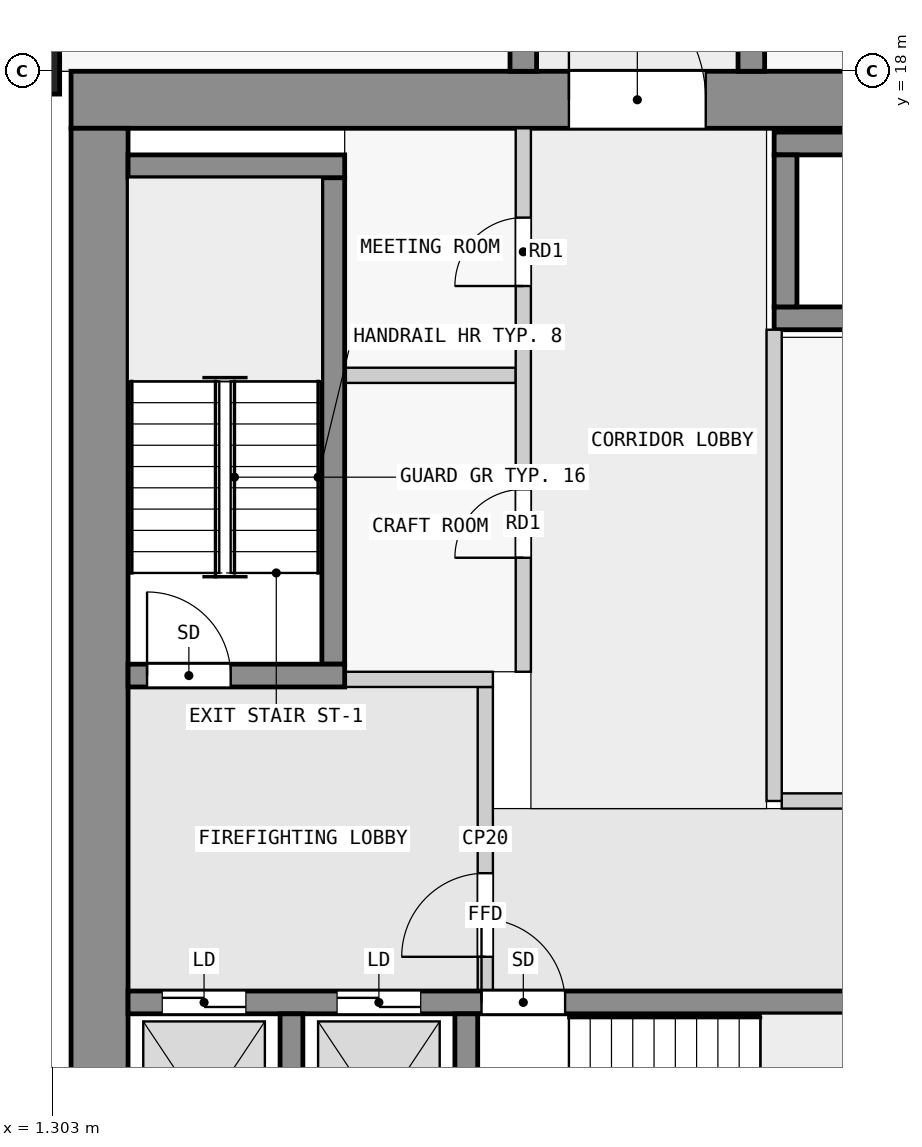
"""IFC4 building model, lengths in metres.
Left out: names, types, materials, properties, quantities, classifications, styles, units other than length and angle.
Written with IfcOpenShell. Run it as: python <this file> out.ifc"""

import sys

from ifc_helpers import new_model, si_unit, direction, frame, frame_2d, origin, origin_2d, place, context, subcontext, project, spatial, rectangle, extrude, element, fill, save


model = new_model("IFC4")
c1 = context("Model", 3, precision=1e-05, world=origin(), true_north=direction((0.0, 1.0)))
c2 = subcontext(c1, "Body", "Model", "MODEL_VIEW")
j1 = project(units=[si_unit("LENGTHUNIT", "METRE"), si_unit("PLANEANGLEUNIT", "RADIAN")], contexts=[c1])
p1 = place(None, origin())
s1 = spatial("IfcSite", under=j1, at=p1, CompositionType="ELEMENT")
p2 = place(p1, origin())
s2 = spatial("IfcBuilding", under=s1, at=p2, CompositionType="ELEMENT")
p3 = place(p2, frame((0.0, 0.0, 54.8)))
s3 = spatial("IfcBuildingStorey", under=s2, at=p3, CompositionType="ELEMENT", Elevation=54.8)
p4 = place(p3, frame((0.7, 18.0, 0.0), z_axis=(0.0, 0.0, 1.0), x_axis=(0.0, 1.0, 0.0)))
e1 = element("IfcColumn", 1, at=p4, inside=s3, PredefinedType="COLUMN", context=c2, shape_type="SweptSolid", body=[
    extrude(rectangle(XDim=0.6, YDim=1.4, at=origin_2d()), origin(), (0.0, 0.0, 1.0), 3.5),
])
p5 = place(p3, frame((1.55, 17.625, 0.0), z_axis=(0.0, 0.0, 1.0), x_axis=(1.0, 0.0, 0.0)))
e2 = element("IfcWall", 2, at=p5, inside=s3, PredefinedType="SHEAR", context=c2, shape_type="SweptSolid", body=[
    extrude(rectangle(XDim=20.95, YDim=0.75, at=frame_2d((10.475, 0.0))), origin(), (0.0, 0.0, 1.0), 3.25),
])
p6 = place(p5, frame((6.55, 0.0, 0.0)))
e3 = element("IfcOpeningElement", 3, at=p6, cuts=e2, PredefinedType="OPENING", context=c2, shape_type="SweptSolid", body=[
    extrude(rectangle(XDim=1.8, YDim=2.1, at=frame_2d((0.9, 1.05))), frame((0.0, 0.385, 0.0), z_axis=(0.0, -1.0, 0.0), x_axis=(1.0, 0.0, 0.0)), (0.0, 0.0, 1.0), 0.77),
])
p7 = place(p3, frame((1.925, 2.5, 0.0), z_axis=(0.0, 0.0, 1.0), x_axis=(0.0, 1.0, 0.0)))
e4 = element("IfcWall", 4, at=p7, inside=s3, PredefinedType="SHEAR", context=c2, shape_type="SweptSolid", body=[
    extrude(rectangle(XDim=14.75, YDim=0.75, at=frame_2d((7.375, 0.0))), origin(), (0.0, 0.0, 1.0), 3.25),
])
for number, where, z_axis, x_axis in (
    (5, (4.45, 2.8, 0.0), (0.0, 0.0, 1.0), (0.0, 1.0, 0.0)),
    (6, (6.75, 2.8, 0.0), (0.0, 0.0, 1.0), (0.0, 1.0, 0.0)),
):
    element("IfcWall", number, at=place(p3, frame(where, z_axis=z_axis, x_axis=x_axis)), inside=s3, PredefinedType="SHEAR", context=c2, shape_type="SweptSolid", body=[
        extrude(rectangle(XDim=2.8, YDim=0.3, at=frame_2d((1.4, 0.0))), origin(), (0.0, 0.0, 1.0), 3.25),
    ])
p8 = place(p3, frame((2.3, 5.75, 0.0), z_axis=(0.0, 0.0, 1.0), x_axis=(1.0, 0.0, 0.0)))
e7 = element("IfcWall", 7, at=p8, inside=s3, PredefinedType="SHEAR", context=c2, shape_type="SweptSolid", body=[
    extrude(rectangle(XDim=18.8, YDim=0.3, at=frame_2d((9.4, 0.0))), origin(), (0.0, 0.0, 1.0), 3.25),
])
p9 = place(p8, frame((4.65, 0.0, 0.0)))
e8 = element("IfcOpeningElement", 8, at=p9, cuts=e7, PredefinedType="OPENING", context=c2, shape_type="SweptSolid", body=[
    extrude(rectangle(XDim=1.1, YDim=2.1, at=frame_2d((0.55, 1.05))), frame((0.0, 0.16, 0.0), z_axis=(0.0, -1.0, 0.0), x_axis=(1.0, 0.0, 0.0)), (0.0, 0.0, 1.0), 0.32),
])
p10 = place(p8, frame((0.45, 0.0, 0.0)))
e9 = element("IfcOpeningElement", 9, at=p10, cuts=e7, PredefinedType="OPENING", context=c2, shape_type="SweptSolid", body=[
    extrude(rectangle(XDim=1.1, YDim=2.1, at=frame_2d((0.55, 1.05))), frame((0.0, 0.16, 0.0), z_axis=(0.0, -1.0, 0.0), x_axis=(1.0, 0.0, 0.0)), (0.0, 0.0, 1.0), 0.32),
])
p11 = place(p8, frame((2.75, 0.0, 0.0)))
e10 = element("IfcOpeningElement", 10, at=p11, cuts=e7, PredefinedType="OPENING", context=c2, shape_type="SweptSolid", body=[
    extrude(rectangle(XDim=1.1, YDim=2.1, at=frame_2d((0.55, 1.05))), frame((0.0, 0.16, 0.0), z_axis=(0.0, -1.0, 0.0), x_axis=(1.0, 0.0, 0.0)), (0.0, 0.0, 1.0), 0.32),
])
p12 = place(p8, frame((11.85, 0.0, 0.0)))
e11 = element("IfcOpeningElement", 11, at=p12, cuts=e7, PredefinedType="OPENING", context=c2, shape_type="SweptSolid", body=[
    extrude(rectangle(XDim=1.1, YDim=2.1, at=frame_2d((0.55, 1.05))), frame((0.0, 0.16, 0.0), z_axis=(0.0, -1.0, 0.0), x_axis=(1.0, 0.0, 0.0)), (0.0, 0.0, 1.0), 0.32),
])
p13 = place(p8, frame((14.35, 0.0, 0.0)))
e12 = element("IfcOpeningElement", 12, at=p13, cuts=e7, PredefinedType="OPENING", context=c2, shape_type="SweptSolid", body=[
    extrude(rectangle(XDim=1.1, YDim=2.1, at=frame_2d((0.55, 1.05))), frame((0.0, 0.16, 0.0), z_axis=(0.0, -1.0, 0.0), x_axis=(1.0, 0.0, 0.0)), (0.0, 0.0, 1.0), 0.32),
])
p14 = place(p8, frame((16.85, 0.0, 0.0)))
e13 = element("IfcOpeningElement", 13, at=p14, cuts=e7, PredefinedType="OPENING", context=c2, shape_type="SweptSolid", body=[
    extrude(rectangle(XDim=1.1, YDim=2.1, at=frame_2d((0.55, 1.05))), frame((0.0, 0.16, 0.0), z_axis=(0.0, -1.0, 0.0), x_axis=(1.0, 0.0, 0.0)), (0.0, 0.0, 1.0), 0.32),
])
p15 = place(p3, frame((2.3, 10.05, 0.0), z_axis=(0.0, 0.0, 1.0), x_axis=(1.0, 0.0, 0.0)))
e14 = element("IfcWall", 14, at=p15, inside=s3, PredefinedType="SHEAR", context=c2, shape_type="SweptSolid", body=[
    extrude(rectangle(XDim=2.85, YDim=0.3, at=frame_2d((1.425, 0.0))), origin(), (0.0, 0.0, 1.0), 3.25),
])
p16 = place(p15, frame((0.25, 0.0, 0.0)))
e15 = element("IfcOpeningElement", 15, at=p16, cuts=e14, PredefinedType="OPENING", context=c2, shape_type="SweptSolid", body=[
    extrude(rectangle(XDim=1.1, YDim=2.1, at=frame_2d((0.55, 1.05))), frame((0.0, 0.16, 0.0), z_axis=(0.0, -1.0, 0.0), x_axis=(1.0, 0.0, 0.0)), (0.0, 0.0, 1.0), 0.32),
])
p17 = place(p3, frame((5.0, 10.2, 0.0), z_axis=(0.0, 0.0, 1.0), x_axis=(0.0, 1.0, 0.0)))
e16 = element("IfcWall", 16, at=p17, inside=s3, PredefinedType="SHEAR", context=c2, shape_type="SweptSolid", body=[
    extrude(rectangle(XDim=6.4, YDim=0.3, at=frame_2d((3.2, 0.0))), origin(), (0.0, 0.0, 1.0), 3.25),
])
p18 = place(p3, frame((2.3, 16.75, 0.0), z_axis=(0.0, 0.0, 1.0), x_axis=(1.0, 0.0, 0.0)))
e17 = element("IfcWall", 17, at=p18, inside=s3, PredefinedType="SHEAR", context=c2, shape_type="SweptSolid", body=[
    extrude(rectangle(XDim=2.85, YDim=0.3, at=frame_2d((1.425, 0.0))), origin(), (0.0, 0.0, 1.0), 3.25),
])
for number, where, z_axis, x_axis in (
    (18, (10.8, 17.05, 0.0), (0.0, 0.0, 1.0), (1.0, 0.0, 0.0)),
    (19, (10.8, 14.75, 0.0), (0.0, 0.0, 1.0), (1.0, 0.0, 0.0)),
):
    element("IfcWall", number, at=place(p3, frame(where, z_axis=z_axis, x_axis=x_axis)), inside=s3, PredefinedType="SHEAR", context=c2, shape_type="SweptSolid", body=[
        extrude(rectangle(XDim=7.8, YDim=0.3, at=frame_2d((3.9, 0.0))), origin(), (0.0, 0.0, 1.0), 3.25),
    ])
p19 = place(p3, frame((10.95, 14.9, 0.0), z_axis=(0.0, 0.0, 1.0), x_axis=(0.0, 1.0, 0.0)))
e20 = element("IfcWall", 20, at=p19, inside=s3, PredefinedType="SHEAR", context=c2, shape_type="SweptSolid", body=[
    extrude(rectangle(XDim=2.0, YDim=0.3, at=frame_2d((1.0, 0.0))), origin(), (0.0, 0.0, 1.0), 3.25),
])
p20 = place(p3, frame((7.5, 18.0, 0.0), z_axis=(0.0, 0.0, 1.0), x_axis=(0.0, 1.0, 0.0)))
e21 = element("IfcWall", 21, at=p20, inside=s3, PredefinedType="SHEAR", context=c2, shape_type="SweptSolid", body=[
    extrude(rectangle(XDim=27.0, YDim=0.35, at=frame_2d((13.5, 0.0))), origin(), (0.0, 0.0, 1.0), 3.25),
])
p21 = place(p20, frame((1.75, 0.0, 0.0)))
e22 = element("IfcOpeningElement", 22, at=p21, cuts=e21, PredefinedType="OPENING", context=c2, shape_type="SweptSolid", body=[
    extrude(rectangle(XDim=1.0, YDim=2.1, at=frame_2d((0.5, 1.05))), frame((0.0, 0.185, 0.0), z_axis=(0.0, -1.0, 0.0), x_axis=(1.0, 0.0, 0.0)), (0.0, 0.0, 1.0), 0.37),
])
p22 = place(p20, frame((8.55, 0.0, 0.0)))
e23 = element("IfcOpeningElement", 23, at=p22, cuts=e21, PredefinedType="OPENING", context=c2, shape_type="SweptSolid", body=[
    extrude(rectangle(XDim=1.0, YDim=2.1, at=frame_2d((0.5, 1.05))), frame((0.0, 0.185, 0.0), z_axis=(0.0, -1.0, 0.0), x_axis=(1.0, 0.0, 0.0)), (0.0, 0.0, 1.0), 0.37),
])
p23 = place(p20, frame((15.25, 0.0, 0.0)))
e24 = element("IfcOpeningElement", 24, at=p23, cuts=e21, PredefinedType="OPENING", context=c2, shape_type="SweptSolid", body=[
    extrude(rectangle(XDim=1.0, YDim=2.1, at=frame_2d((0.5, 1.05))), frame((0.0, 0.185, 0.0), z_axis=(0.0, -1.0, 0.0), x_axis=(1.0, 0.0, 0.0)), (0.0, 0.0, 1.0), 0.37),
])
p24 = place(p20, frame((21.35, 0.0, 0.0)))
e25 = element("IfcOpeningElement", 25, at=p24, cuts=e21, PredefinedType="OPENING", context=c2, shape_type="SweptSolid", body=[
    extrude(rectangle(XDim=1.0, YDim=2.1, at=frame_2d((0.5, 1.05))), frame((0.0, 0.185, 0.0), z_axis=(0.0, -1.0, 0.0), x_axis=(1.0, 0.0, 0.0)), (0.0, 0.0, 1.0), 0.37),
])
p25 = place(p3, frame((10.5, 18.0, 0.0), z_axis=(0.0, 0.0, 1.0), x_axis=(0.0, 1.0, 0.0)))
e26 = element("IfcWall", 26, at=p25, inside=s3, PredefinedType="SHEAR", context=c2, shape_type="SweptSolid", body=[
    extrude(rectangle(XDim=27.0, YDim=0.35, at=frame_2d((13.5, 0.0))), origin(), (0.0, 0.0, 1.0), 3.25),
])
p26 = place(p25, frame((4.05, 0.0, 0.0)))
e27 = element("IfcOpeningElement", 27, at=p26, cuts=e26, PredefinedType="OPENING", context=c2, shape_type="SweptSolid", body=[
    extrude(rectangle(XDim=1.0, YDim=2.1, at=frame_2d((0.5, 1.05))), frame((0.0, 0.185, 0.0), z_axis=(0.0, -1.0, 0.0), x_axis=(1.0, 0.0, 0.0)), (0.0, 0.0, 1.0), 0.37),
])
p27 = place(p25, frame((10.75, 0.0, 0.0)))
e28 = element("IfcOpeningElement", 28, at=p27, cuts=e26, PredefinedType="OPENING", context=c2, shape_type="SweptSolid", body=[
    extrude(rectangle(XDim=1.0, YDim=2.1, at=frame_2d((0.5, 1.05))), frame((0.0, 0.185, 0.0), z_axis=(0.0, -1.0, 0.0), x_axis=(1.0, 0.0, 0.0)), (0.0, 0.0, 1.0), 0.37),
])
p28 = place(p25, frame((15.25, 0.0, 0.0)))
e29 = element("IfcOpeningElement", 29, at=p28, cuts=e26, PredefinedType="OPENING", context=c2, shape_type="SweptSolid", body=[
    extrude(rectangle(XDim=1.0, YDim=2.1, at=frame_2d((0.5, 1.05))), frame((0.0, 0.185, 0.0), z_axis=(0.0, -1.0, 0.0), x_axis=(1.0, 0.0, 0.0)), (0.0, 0.0, 1.0), 0.37),
])
p29 = place(p25, frame((19.75, 0.0, 0.0)))
e30 = element("IfcOpeningElement", 30, at=p29, cuts=e26, PredefinedType="OPENING", context=c2, shape_type="SweptSolid", body=[
    extrude(rectangle(XDim=1.0, YDim=2.1, at=frame_2d((0.5, 1.05))), frame((0.0, 0.185, 0.0), z_axis=(0.0, -1.0, 0.0), x_axis=(1.0, 0.0, 0.0)), (0.0, 0.0, 1.0), 0.37),
])
p30 = place(p25, frame((23.25, 0.0, 0.0)))
e31 = element("IfcOpeningElement", 31, at=p30, cuts=e26, PredefinedType="OPENING", context=c2, shape_type="SweptSolid", body=[
    extrude(rectangle(XDim=0.9, YDim=2.1, at=frame_2d((0.45, 1.05))), frame((0.0, 0.185, 0.0), z_axis=(0.0, -1.0, 0.0), x_axis=(1.0, 0.0, 0.0)), (0.0, 0.0, 1.0), 0.37),
])
p31 = place(p25, frame((25.45, 0.0, 0.0)))
e32 = element("IfcOpeningElement", 32, at=p31, cuts=e26, PredefinedType="OPENING", context=c2, shape_type="SweptSolid", body=[
    extrude(rectangle(XDim=1.0, YDim=2.1, at=frame_2d((0.5, 1.05))), frame((0.0, 0.185, 0.0), z_axis=(0.0, -1.0, 0.0), x_axis=(1.0, 0.0, 0.0)), (0.0, 0.0, 1.0), 0.37),
])
p32 = place(p3, frame((7.0, 5.9, 0.0), z_axis=(0.0, 0.0, 1.0), x_axis=(0.0, 1.0, 0.0)))
e33 = element("IfcWall", 33, at=p32, inside=s3, PredefinedType="PARTITIONING", context=c2, shape_type="SweptSolid", body=[
    extrude(rectangle(XDim=4.0, YDim=0.2, at=frame_2d((2.0, 0.0))), origin(), (0.0, 0.0, 1.0), 3.25),
])
p33 = place(p32, frame((0.45, 0.0, 0.0)))
e34 = element("IfcOpeningElement", 34, at=p33, cuts=e33, PredefinedType="OPENING", context=c2, shape_type="SweptSolid", body=[
    extrude(rectangle(XDim=1.1, YDim=2.1, at=frame_2d((0.55, 1.05))), frame((0.0, 0.11, 0.0), z_axis=(0.0, -1.0, 0.0), x_axis=(1.0, 0.0, 0.0)), (0.0, 0.0, 1.0), 0.22),
])
p34 = place(p3, frame((5.15, 10.0, 0.0), z_axis=(0.0, 0.0, 1.0), x_axis=(1.0, 0.0, 0.0)))
e35 = element("IfcWall", 35, at=p34, inside=s3, PredefinedType="PARTITIONING", context=c2, shape_type="SweptSolid", body=[
    extrude(rectangle(XDim=1.95, YDim=0.2, at=frame_2d((0.975, 0.0))), origin(), (0.0, 0.0, 1.0), 3.25),
])
p35 = place(p3, frame((10.8, 8.4, 0.0), z_axis=(0.0, 0.0, 1.0), x_axis=(0.0, 1.0, 0.0)))
e36 = element("IfcWall", 36, at=p35, inside=s3, PredefinedType="PARTITIONING", context=c2, shape_type="SweptSolid", body=[
    extrude(rectangle(XDim=6.2, YDim=0.2, at=frame_2d((3.1, 0.0))), origin(), (0.0, 0.0, 1.0), 3.25),
])
p36 = place(p3, frame((10.9, 8.4, 0.0), z_axis=(0.0, 0.0, 1.0), x_axis=(1.0, 0.0, 0.0)))
e37 = element("IfcWall", 37, at=p36, inside=s3, PredefinedType="PARTITIONING", context=c2, shape_type="SweptSolid", body=[
    extrude(rectangle(XDim=5.0, YDim=0.2, at=frame_2d((2.5, 0.0))), origin(), (0.0, 0.0, 1.0), 3.25),
])
p37 = place(p3, frame((7.5, 10.1, 0.0), z_axis=(0.0, 0.0, 1.0), x_axis=(0.0, 1.0, 0.0)))
e38 = element("IfcWall", 38, at=p37, inside=s3, PredefinedType="PARTITIONING", context=c2, shape_type="SweptSolid", body=[
    extrude(rectangle(XDim=7.15, YDim=0.2, at=frame_2d((3.575, 0.0))), origin(), (0.0, 0.0, 1.0), 3.25),
])
p38 = place(p37, frame((1.5, 0.0, 0.0)))
e39 = element("IfcOpeningElement", 39, at=p38, cuts=e38, PredefinedType="OPENING", context=c2, shape_type="SweptSolid", body=[
    extrude(rectangle(XDim=0.9, YDim=2.1, at=frame_2d((0.45, 1.05))), frame((0.0, 0.11, 0.0), z_axis=(0.0, -1.0, 0.0), x_axis=(1.0, 0.0, 0.0)), (0.0, 0.0, 1.0), 0.22),
])
p39 = place(p37, frame((5.075, 0.0, 0.0)))
e40 = element("IfcOpeningElement", 40, at=p39, cuts=e38, PredefinedType="OPENING", context=c2, shape_type="SweptSolid", body=[
    extrude(rectangle(XDim=0.9, YDim=2.1, at=frame_2d((0.45, 1.05))), frame((0.0, 0.11, 0.0), z_axis=(0.0, -1.0, 0.0), x_axis=(1.0, 0.0, 0.0)), (0.0, 0.0, 1.0), 0.22),
])
p40 = place(p3, frame((5.15, 14.0, 0.0), z_axis=(0.0, 0.0, 1.0), x_axis=(1.0, 0.0, 0.0)))
e41 = element("IfcWall", 41, at=p40, inside=s3, PredefinedType="PARTITIONING", context=c2, shape_type="SweptSolid", body=[
    extrude(rectangle(XDim=2.25, YDim=0.2, at=frame_2d((1.125, 0.0))), origin(), (0.0, 0.0, 1.0), 3.25),
])
p41 = place(p33, origin())
e42 = element("IfcDoor", 42, at=p41, inside=s3, OperationType="SINGLE_SWING_LEFT", PredefinedType="DOOR", context=c2, shape_type="SweptSolid", body=[
    extrude(rectangle(XDim=1.1, YDim=2.1, at=frame_2d((0.55, 1.05))), frame((0.0, 0.025, 0.0), z_axis=(0.0, -1.0, 0.0), x_axis=(1.0, 0.0, 0.0)), (0.0, 0.0, 1.0), 0.05),
])
fill(e34, e42)
p42 = place(p16, origin())
e43 = element("IfcDoor", 43, at=p42, inside=s3, OperationType="SINGLE_SWING_RIGHT", PredefinedType="DOOR", context=c2, shape_type="SweptSolid", body=[
    extrude(rectangle(XDim=1.1, YDim=2.1, at=frame_2d((0.55, 1.05))), frame((0.0, 0.025, 0.0), z_axis=(0.0, -1.0, 0.0), x_axis=(1.0, 0.0, 0.0)), (0.0, 0.0, 1.0), 0.05),
])
fill(e15, e43)
p43 = place(p9, origin())
e44 = element("IfcDoor", 44, at=p43, inside=s3, OperationType="SINGLE_SWING_LEFT", PredefinedType="DOOR", context=c2, shape_type="SweptSolid", body=[
    extrude(rectangle(XDim=1.1, YDim=2.1, at=frame_2d((0.55, 1.05))), frame((0.0, 0.025, 0.0), z_axis=(0.0, -1.0, 0.0), x_axis=(1.0, 0.0, 0.0)), (0.0, 0.0, 1.0), 0.05),
])
fill(e8, e44)
p44 = place(p10, origin())
e45 = element("IfcDoor", 45, at=p44, inside=s3, OperationType="DOUBLE_DOOR_SLIDING", PredefinedType="DOOR", context=c2, shape_type="SweptSolid", body=[
    extrude(rectangle(XDim=1.1, YDim=2.1, at=frame_2d((0.55, 1.05))), frame((0.0, 0.025, 0.0), z_axis=(0.0, -1.0, 0.0), x_axis=(1.0, 0.0, 0.0)), (0.0, 0.0, 1.0), 0.05),
])
fill(e9, e45)
p45 = place(p11, origin())
e46 = element("IfcDoor", 46, at=p45, inside=s3, OperationType="DOUBLE_DOOR_SLIDING", PredefinedType="DOOR", context=c2, shape_type="SweptSolid", body=[
    extrude(rectangle(XDim=1.1, YDim=2.1, at=frame_2d((0.55, 1.05))), frame((0.0, 0.025, 0.0), z_axis=(0.0, -1.0, 0.0), x_axis=(1.0, 0.0, 0.0)), (0.0, 0.0, 1.0), 0.05),
])
fill(e10, e46)
p46 = place(p6, origin())
e47 = element("IfcDoor", 47, at=p46, inside=s3, OperationType="DOUBLE_DOOR_SINGLE_SWING", PredefinedType="DOOR", context=c2, shape_type="SweptSolid", body=[
    extrude(rectangle(XDim=1.8, YDim=2.1, at=frame_2d((0.9, 1.05))), frame((0.0, 0.025, 0.0), z_axis=(0.0, -1.0, 0.0), x_axis=(1.0, 0.0, 0.0)), (0.0, 0.0, 1.0), 0.05),
])
fill(e3, e47)
p47 = place(p38, origin())
e48 = element("IfcDoor", 48, at=p47, inside=s3, OperationType="SINGLE_SWING_RIGHT", PredefinedType="DOOR", context=c2, shape_type="SweptSolid", body=[
    extrude(rectangle(XDim=0.9, YDim=2.1, at=frame_2d((0.45, 1.05))), frame((0.0, 0.025, 0.0), z_axis=(0.0, -1.0, 0.0), x_axis=(1.0, 0.0, 0.0)), (0.0, 0.0, 1.0), 0.05),
])
fill(e39, e48)
p48 = place(p39, origin())
e49 = element("IfcDoor", 49, at=p48, inside=s3, OperationType="SINGLE_SWING_RIGHT", PredefinedType="DOOR", context=c2, shape_type="SweptSolid", body=[
    extrude(rectangle(XDim=0.9, YDim=2.1, at=frame_2d((0.45, 1.05))), frame((0.0, 0.025, 0.0), z_axis=(0.0, -1.0, 0.0), x_axis=(1.0, 0.0, 0.0)), (0.0, 0.0, 1.0), 0.05),
])
fill(e40, e49)
save(model, sys.argv[1])
